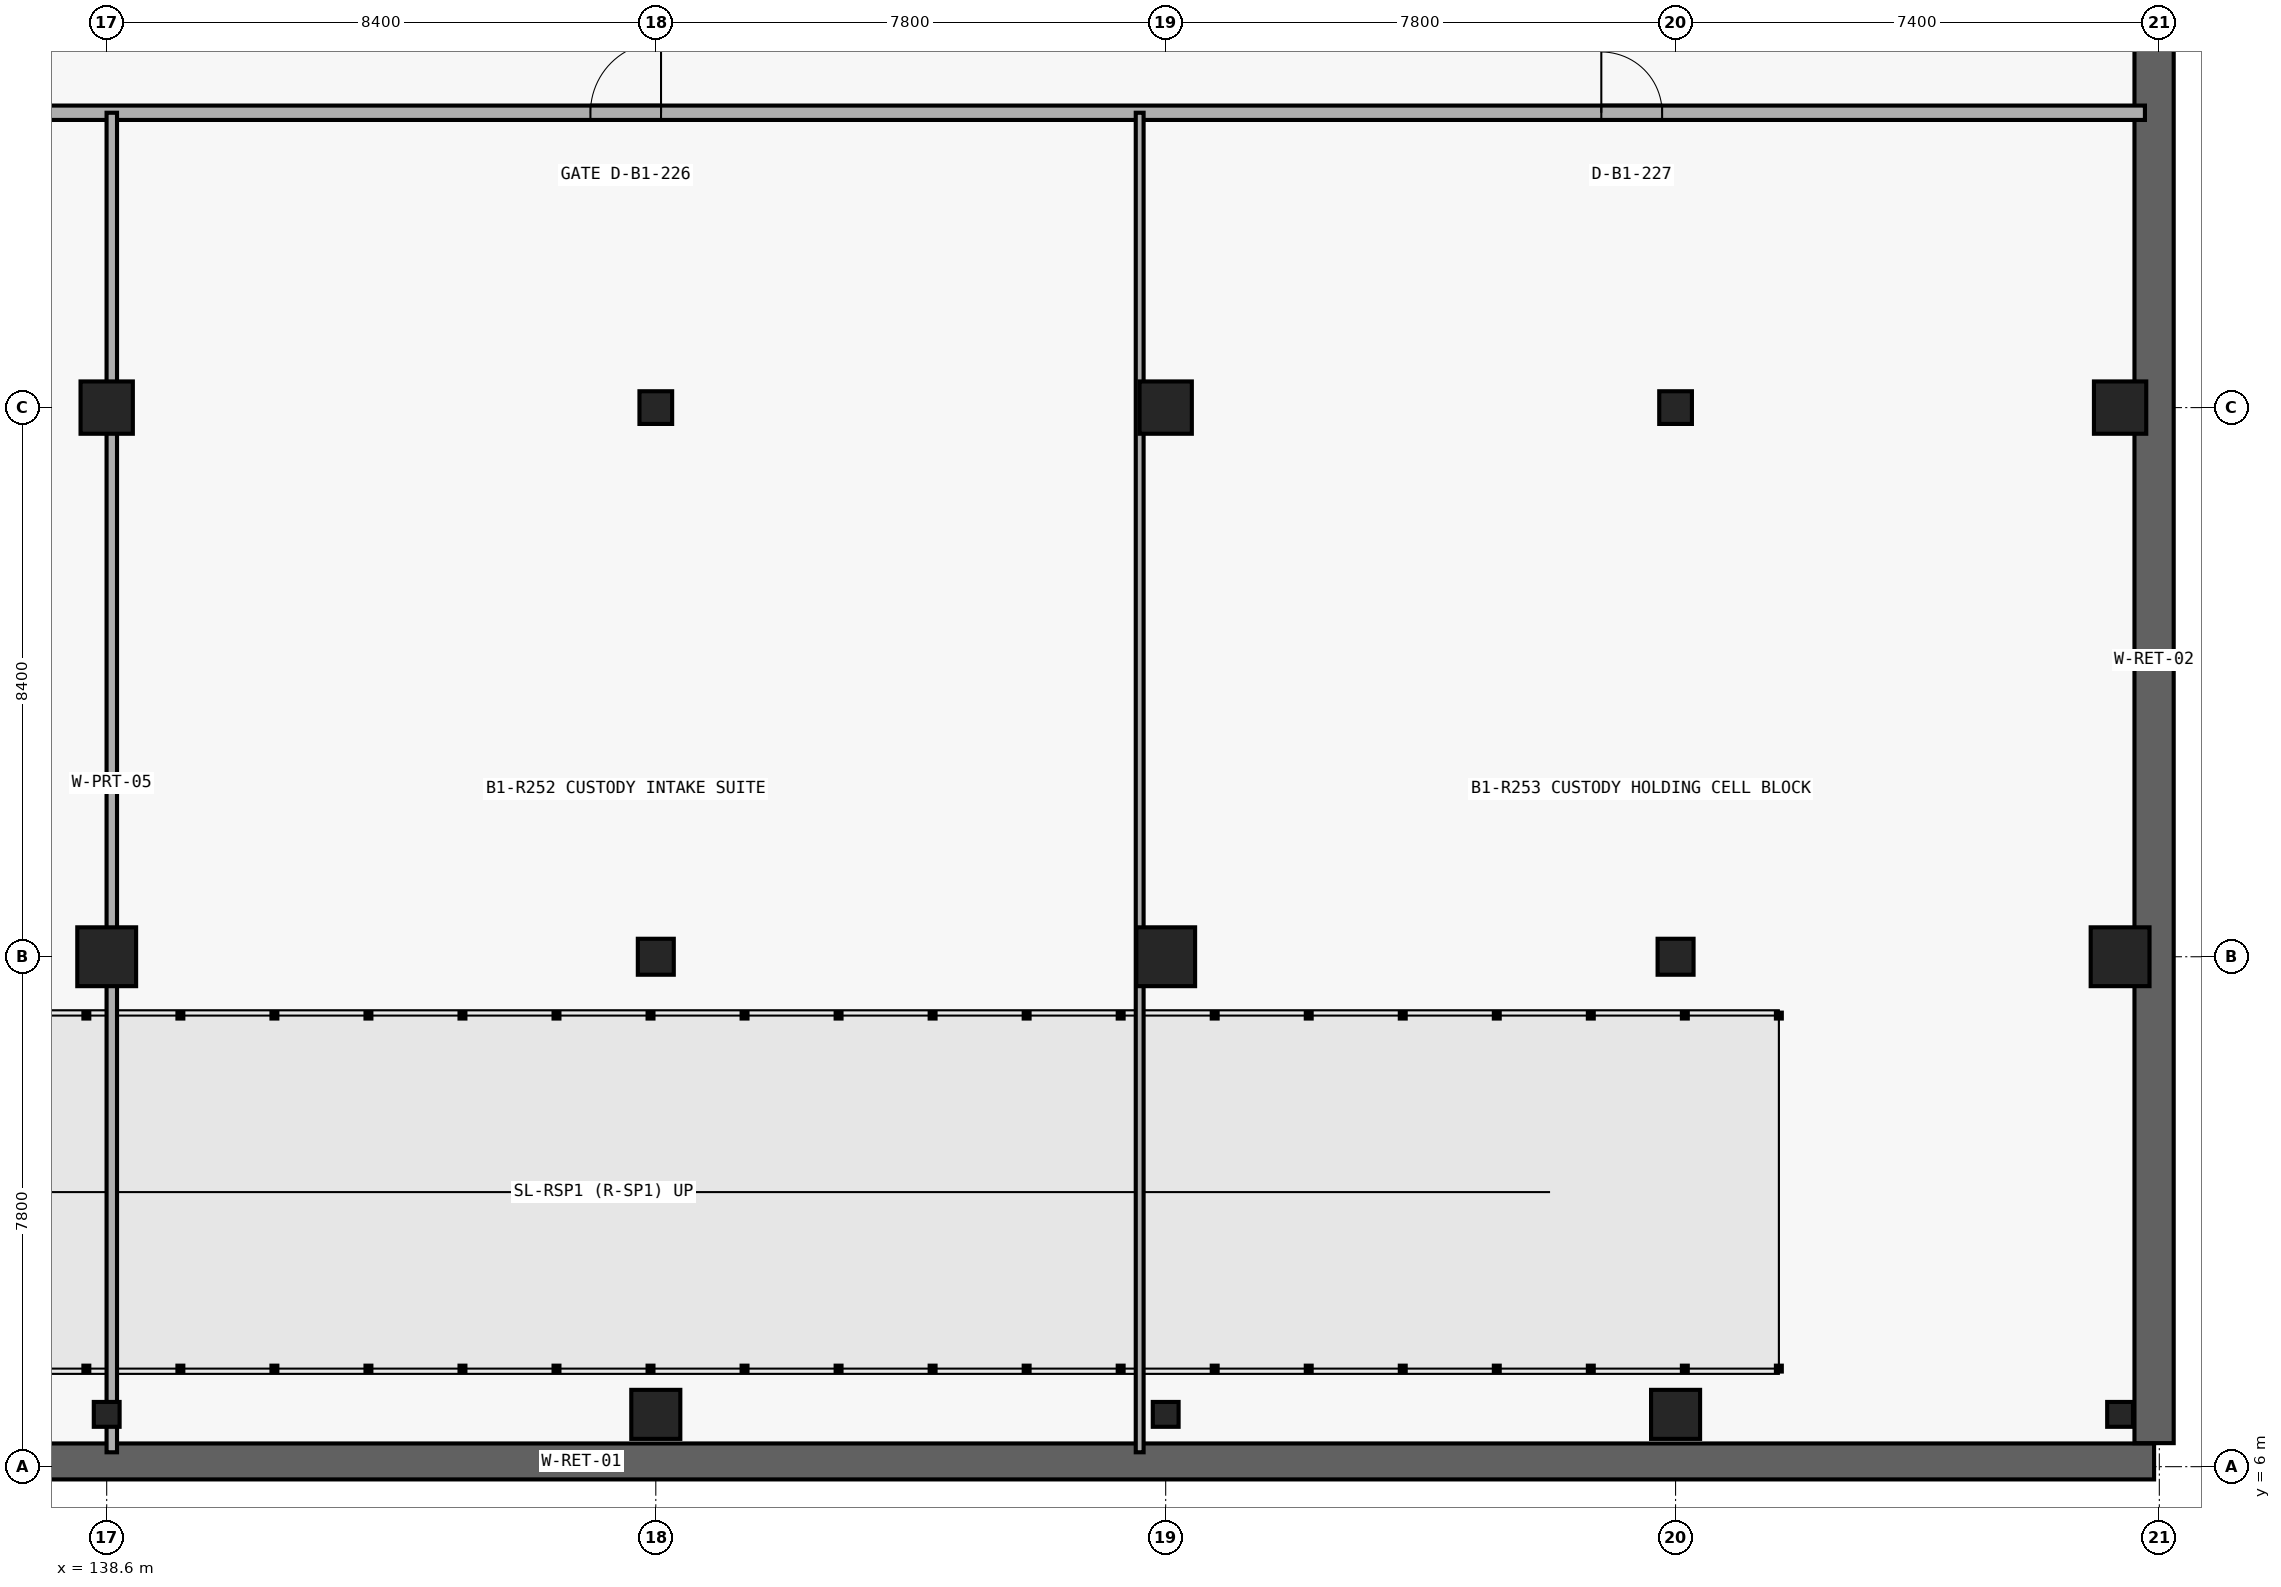
"""IFC4 building model, lengths in metres.
Left out: names, types, materials, properties, quantities, classifications, styles, units other than length and angle.
Written with IfcOpenShell. Run it as: python <this file> out.ifc"""

import sys

from ifc_helpers import new_model, si_unit, direction, frame, frame_2d, origin_with_axes, origin_2d_with_axis, place, context, subcontext, project, spatial, rectangle, i_section, extrude, element, fill, save


model = new_model("IFC4")
c1 = context("Model", 3, precision=1e-05, world=origin_with_axes(), true_north=direction((0.0, 1.0)))
c2 = subcontext(c1, "Body", "Model", "MODEL_VIEW")
j1 = project(units=[si_unit("LENGTHUNIT", "METRE"), si_unit("PLANEANGLEUNIT", "RADIAN")], contexts=[c1])
p1 = place(None, origin_with_axes())
s1 = spatial("IfcSite", under=j1, at=p1, CompositionType="ELEMENT")
p2 = place(p1, origin_with_axes())
s2 = spatial("IfcBuilding", under=s1, at=p2, CompositionType="ELEMENT")
p3 = place(p2, frame((0.0, 0.0, -4.8), z_axis=(0.0, 0.0, 1.0), x_axis=(1.0, 0.0, 0.0)))
s3 = spatial("IfcBuildingStorey", under=s2, at=p3, CompositionType="ELEMENT", Elevation=-4.8)
p4 = place(None, frame((121.8, 6.08, -5.35), z_axis=(0.0, 0.0, 1.0), x_axis=(1.0, 0.0, 0.0)))
e1 = element("IfcWall", 1, at=p4, inside=s3, PredefinedType="USERDEFINED", context=c2, shape_type="SweptSolid", body=[
    extrude(rectangle(XDim=48.12, YDim=0.55, at=frame_2d((24.06, 0.0), x_axis=(1.0, 0.0))), origin_with_axes(), (0.0, 0.0, 1.0), 5.01),
])
p5 = place(None, frame((169.92, 6.36, -5.35), z_axis=(0.0, 0.0, 1.0), x_axis=(0.0, 1.0, 0.0)))
e2 = element("IfcWall", 2, at=p5, inside=s3, PredefinedType="USERDEFINED", context=c2, shape_type="SweptSolid", body=[
    extrude(rectangle(XDim=23.96, YDim=0.6, at=frame_2d((11.98, 0.0), x_axis=(1.0, 0.0))), origin_with_axes(), (0.0, 0.0, 1.0), 5.01),
])
p6 = place(None, frame((121.94, 26.71, -4.8), z_axis=(0.0, 0.0, 1.0), x_axis=(1.0, 0.0, 0.0)))
e3 = element("IfcWall", 3, at=p6, inside=s3, PredefinedType="PARTITIONING", context=c2, shape_type="SweptSolid", body=[
    extrude(rectangle(XDim=47.84, YDim=0.22, at=frame_2d((23.92, 0.0), x_axis=(1.0, 0.0))), origin_with_axes(), (0.0, 0.0, 1.0), 4.44),
])
p7 = place(None, frame((130.471, 26.71, -4.8), z_axis=(0.0, 0.0, 1.0), x_axis=(1.0, 0.0, 0.0)))
e4 = element("IfcOpeningElement", 4, at=p7, cuts=e3, PredefinedType="OPENING", context=c2, shape_type="SweptSolid", body=[
    extrude(rectangle(XDim=1.14, YDim=2.18, at=frame_2d((0.0, 1.09), x_axis=(1.0, 0.0))), frame((0.0, 0.12, 0.0), z_axis=(0.0, -1.0, 0.0), x_axis=(1.0, 0.0, 0.0)), (0.0, 0.0, 1.0), 0.24),
])
p8 = place(None, frame((146.54, 26.71, -4.8), z_axis=(0.0, 0.0, 1.0), x_axis=(1.0, 0.0, 0.0)))
e5 = element("IfcOpeningElement", 5, at=p8, cuts=e3, PredefinedType="OPENING", context=c2, shape_type="SweptSolid", body=[
    extrude(rectangle(XDim=1.08, YDim=2.18, at=frame_2d((0.0, 1.09), x_axis=(1.0, 0.0))), frame((0.0, 0.12, 0.0), z_axis=(0.0, -1.0, 0.0), x_axis=(1.0, 0.0, 0.0)), (0.0, 0.0, 1.0), 0.24),
])
p9 = place(None, frame((161.929, 26.71, -4.8), z_axis=(0.0, 0.0, 1.0), x_axis=(1.0, 0.0, 0.0)))
e6 = element("IfcOpeningElement", 6, at=p9, cuts=e3, PredefinedType="OPENING", context=c2, shape_type="SweptSolid", body=[
    extrude(rectangle(XDim=0.93, YDim=2.1, at=frame_2d((0.0, 1.05), x_axis=(1.0, 0.0))), frame((0.0, 0.12, 0.0), z_axis=(0.0, -1.0, 0.0), x_axis=(1.0, 0.0, 0.0)), (0.0, 0.0, 1.0), 0.24),
])
p10 = place(None, frame((138.678, 6.22, -4.8), z_axis=(0.0, 0.0, 1.0), x_axis=(0.0, 1.0, 0.0)))
e7 = element("IfcWall", 7, at=p10, inside=s3, PredefinedType="PARTITIONING", context=c2, shape_type="SweptSolid", body=[
    extrude(rectangle(XDim=20.49, YDim=0.16, at=frame_2d((10.245, 0.0), x_axis=(1.0, 0.0))), origin_with_axes(), (0.0, 0.0, 1.0), 3.584),
])
p11 = place(None, frame((154.402, 6.22, -4.8), z_axis=(0.0, 0.0, 1.0), x_axis=(0.0, 1.0, 0.0)))
e8 = element("IfcWall", 8, at=p11, inside=s3, PredefinedType="PARTITIONING", context=c2, shape_type="SweptSolid", body=[
    extrude(rectangle(XDim=20.49, YDim=0.12, at=frame_2d((10.245, 0.0), x_axis=(1.0, 0.0))), origin_with_axes(), (0.0, 0.0, 1.0), 4.44),
])
p12 = place(None, frame((138.6, 6.8, -5.35), z_axis=(0.0, 0.0, 1.0), x_axis=(1.0, 0.0, 0.0)))
e9 = element("IfcColumn", 9, at=p12, inside=s3, PredefinedType="COLUMN", context=c2, shape_type="SweptSolid", body=[
    extrude(i_section(OverallWidth=0.395, OverallDepth=0.38, WebThickness=0.019, FlangeThickness=0.03, at=origin_2d_with_axis()), origin_with_axes(), (0.0, 0.0, 1.0), 5.35),
])
p13 = place(None, frame((138.6, 13.8, -5.35), z_axis=(0.0, 0.0, 1.0), x_axis=(1.0, 0.0, 0.0)))
e10 = element("IfcColumn", 10, at=p13, inside=s3, PredefinedType="COLUMN", context=c2, shape_type="SweptSolid", body=[
    extrude(rectangle(XDim=0.9, YDim=0.9, at=origin_2d_with_axis()), origin_with_axes(), (0.0, 0.0, 1.0), 5.35),
])
p14 = place(None, frame((138.6, 22.2, -5.35), z_axis=(0.0, 0.0, 1.0), x_axis=(1.0, 0.0, 0.0)))
e11 = element("IfcColumn", 11, at=p14, inside=s3, PredefinedType="COLUMN", context=c2, shape_type="SweptSolid", body=[
    extrude(rectangle(XDim=0.8, YDim=0.8, at=origin_2d_with_axis()), origin_with_axes(), (0.0, 0.0, 1.0), 5.35),
])
p15 = place(None, frame((147.0, 6.8, -5.35), z_axis=(0.0, 0.0, 1.0), x_axis=(1.0, 0.0, 0.0)))
e12 = element("IfcColumn", 12, at=p15, inside=s3, PredefinedType="COLUMN", context=c2, shape_type="SweptSolid", body=[
    extrude(rectangle(XDim=0.75, YDim=0.75, at=origin_2d_with_axis()), origin_with_axes(), (0.0, 0.0, 1.0), 5.35),
])
p16 = place(None, frame((147.0, 13.8, -5.35), z_axis=(0.0, 0.0, 1.0), x_axis=(1.0, 0.0, 0.0)))
e13 = element("IfcColumn", 13, at=p16, inside=s3, PredefinedType="COLUMN", context=c2, shape_type="SweptSolid", body=[
    extrude(i_section(OverallWidth=0.55, OverallDepth=0.55, WebThickness=0.025, FlangeThickness=0.042, at=origin_2d_with_axis()), origin_with_axes(), (0.0, 0.0, 1.0), 5.35),
])
p17 = place(None, frame((147.0, 22.2, -5.35), z_axis=(0.0, 0.0, 1.0), x_axis=(1.0, 0.0, 0.0)))
e14 = element("IfcColumn", 14, at=p17, inside=s3, PredefinedType="COLUMN", context=c2, shape_type="SweptSolid", body=[
    extrude(i_section(OverallWidth=0.5, OverallDepth=0.5, WebThickness=0.022, FlangeThickness=0.036, at=origin_2d_with_axis()), origin_with_axes(), (0.0, 0.0, 1.0), 5.35),
])
p18 = place(None, frame((154.8, 6.8, -5.35), z_axis=(0.0, 0.0, 1.0), x_axis=(1.0, 0.0, 0.0)))
e15 = element("IfcColumn", 15, at=p18, inside=s3, PredefinedType="COLUMN", context=c2, shape_type="SweptSolid", body=[
    extrude(i_section(OverallWidth=0.395, OverallDepth=0.38, WebThickness=0.019, FlangeThickness=0.03, at=origin_2d_with_axis()), origin_with_axes(), (0.0, 0.0, 1.0), 5.35),
])
p19 = place(None, frame((154.8, 13.8, -5.35), z_axis=(0.0, 0.0, 1.0), x_axis=(1.0, 0.0, 0.0)))
e16 = element("IfcColumn", 16, at=p19, inside=s3, PredefinedType="COLUMN", context=c2, shape_type="SweptSolid", body=[
    extrude(rectangle(XDim=0.9, YDim=0.9, at=origin_2d_with_axis()), origin_with_axes(), (0.0, 0.0, 1.0), 5.35),
])
p20 = place(None, frame((154.8, 22.2, -5.35), z_axis=(0.0, 0.0, 1.0), x_axis=(1.0, 0.0, 0.0)))
e17 = element("IfcColumn", 17, at=p20, inside=s3, PredefinedType="COLUMN", context=c2, shape_type="SweptSolid", body=[
    extrude(rectangle(XDim=0.8, YDim=0.8, at=origin_2d_with_axis()), origin_with_axes(), (0.0, 0.0, 1.0), 5.35),
])
p21 = place(None, frame((162.6, 6.8, -5.35), z_axis=(0.0, 0.0, 1.0), x_axis=(1.0, 0.0, 0.0)))
e18 = element("IfcColumn", 18, at=p21, inside=s3, PredefinedType="COLUMN", context=c2, shape_type="SweptSolid", body=[
    extrude(rectangle(XDim=0.75, YDim=0.75, at=origin_2d_with_axis()), origin_with_axes(), (0.0, 0.0, 1.0), 5.35),
])
p22 = place(None, frame((162.6, 13.8, -5.35), z_axis=(0.0, 0.0, 1.0), x_axis=(1.0, 0.0, 0.0)))
e19 = element("IfcColumn", 19, at=p22, inside=s3, PredefinedType="COLUMN", context=c2, shape_type="SweptSolid", body=[
    extrude(i_section(OverallWidth=0.55, OverallDepth=0.55, WebThickness=0.025, FlangeThickness=0.042, at=origin_2d_with_axis()), origin_with_axes(), (0.0, 0.0, 1.0), 5.35),
])
p23 = place(None, frame((162.6, 22.2, -5.35), z_axis=(0.0, 0.0, 1.0), x_axis=(1.0, 0.0, 0.0)))
e20 = element("IfcColumn", 20, at=p23, inside=s3, PredefinedType="COLUMN", context=c2, shape_type="SweptSolid", body=[
    extrude(i_section(OverallWidth=0.5, OverallDepth=0.5, WebThickness=0.022, FlangeThickness=0.036, at=origin_2d_with_axis()), origin_with_axes(), (0.0, 0.0, 1.0), 5.35),
])
p24 = place(None, frame((169.4, 6.8, -5.35), z_axis=(0.0, 0.0, 1.0), x_axis=(1.0, 0.0, 0.0)))
e21 = element("IfcColumn", 21, at=p24, inside=s3, PredefinedType="COLUMN", context=c2, shape_type="SweptSolid", body=[
    extrude(i_section(OverallWidth=0.395, OverallDepth=0.38, WebThickness=0.019, FlangeThickness=0.03, at=origin_2d_with_axis()), origin_with_axes(), (0.0, 0.0, 1.0), 5.35),
])
p25 = place(None, frame((169.4, 13.8, -5.35), z_axis=(0.0, 0.0, 1.0), x_axis=(1.0, 0.0, 0.0)))
e22 = element("IfcColumn", 22, at=p25, inside=s3, PredefinedType="COLUMN", context=c2, shape_type="SweptSolid", body=[
    extrude(rectangle(XDim=0.9, YDim=0.9, at=origin_2d_with_axis()), origin_with_axes(), (0.0, 0.0, 1.0), 5.35),
])
p26 = place(None, frame((169.4, 22.2, -5.35), z_axis=(0.0, 0.0, 1.0), x_axis=(1.0, 0.0, 0.0)))
e23 = element("IfcColumn", 23, at=p26, inside=s3, PredefinedType="COLUMN", context=c2, shape_type="SweptSolid", body=[
    extrude(rectangle(XDim=0.8, YDim=0.8, at=origin_2d_with_axis()), origin_with_axes(), (0.0, 0.0, 1.0), 5.35),
])
p27 = place(None, frame((146.54, 26.71, -4.8), z_axis=(0.0, 0.0, 1.0), x_axis=(1.0, 0.0, 0.0)))
e24 = element("IfcDoor", 24, at=p27, inside=s3, OperationType="SINGLE_SWING_RIGHT", PredefinedType="GATE", context=c2, shape_type="SweptSolid", body=[
    extrude(rectangle(XDim=1.08, YDim=2.18, at=frame_2d((0.0, 1.09), x_axis=(1.0, 0.0))), frame((0.0, 0.04, 0.0), z_axis=(0.0, -1.0, 0.0), x_axis=(1.0, 0.0, 0.0)), (0.0, 0.0, 1.0), 0.08),
])
fill(e5, e24)
p28 = place(None, frame((161.929, 26.71, -4.8), z_axis=(0.0, 0.0, 1.0), x_axis=(1.0, 0.0, 0.0)))
e25 = element("IfcDoor", 25, at=p28, inside=s3, OperationType="SINGLE_SWING_LEFT", PredefinedType="DOOR", context=c2, shape_type="SweptSolid", body=[
    extrude(rectangle(XDim=0.93, YDim=2.1, at=frame_2d((0.0, 1.05), x_axis=(1.0, 0.0))), frame((0.0, 0.04, 0.0), z_axis=(0.0, -1.0, 0.0), x_axis=(1.0, 0.0, 0.0)), (0.0, 0.0, 1.0), 0.08),
])
fill(e6, e25)
save(model, sys.argv[1])
